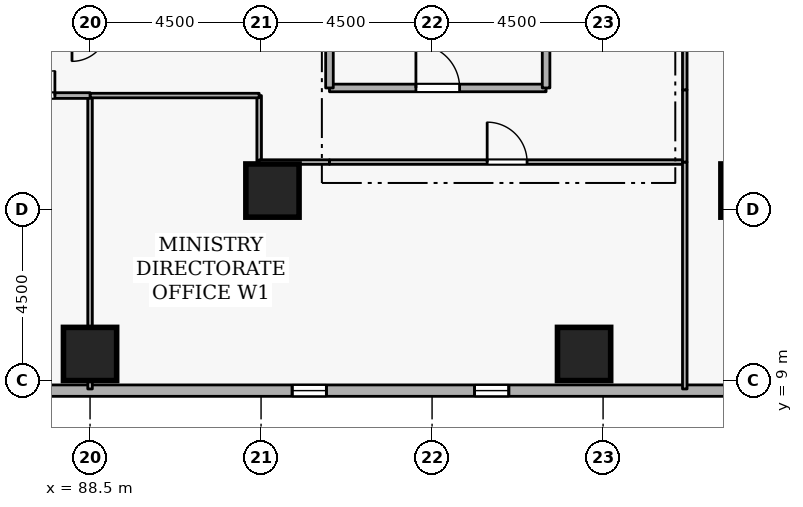
"""IFC4 building model, lengths in metres.
Left out: names, types, materials, properties, quantities, classifications, styles, units other than length and angle.
Written with IfcOpenShell. Run it as: python <this file> out.ifc"""

import sys

from ifc_helpers import new_model, si_unit, direction, frame, frame_2d, origin, origin_2d, place, context, subcontext, project, spatial, rectangle, extrude, element, fill, save


model = new_model("IFC4")
c1 = context("Model", 3, precision=1e-05, world=origin(), true_north=direction((0.0, 1.0)))
c2 = subcontext(c1, "Body", "Model", "MODEL_VIEW")
j1 = project(units=[si_unit("LENGTHUNIT", "METRE"), si_unit("PLANEANGLEUNIT", "RADIAN")], contexts=[c1])
p1 = place(None, origin())
s1 = spatial("IfcSite", under=j1, at=p1, CompositionType="ELEMENT")
p2 = place(p1, origin())
s2 = spatial("IfcBuilding", under=s1, at=p2, CompositionType="ELEMENT")
p3 = place(p2, frame((0.0, 0.0, 64.5)))
s3 = spatial("IfcBuildingStorey", under=s2, at=p3, CompositionType="ELEMENT", Elevation=64.5)
for number, where, z_axis, x_axis in (
    (1, (105.8, 14.0, 0.0), (0.0, 0.0, 1.0), (1.0, 0.0, 0.0)),
    (2, (101.5, 9.7, 0.0), (0.0, 0.0, 1.0), (1.0, 0.0, 0.0)),
    (3, (88.5, 9.7, 0.0), (0.0, 0.0, 1.0), (1.0, 0.0, 0.0)),
    (4, (93.3, 14.0, 0.0), (0.0, 0.0, 1.0), (1.0, 0.0, 0.0)),
):
    element("IfcColumn", number, at=place(p3, frame(where, z_axis=z_axis, x_axis=x_axis)), inside=s3, PredefinedType="COLUMN", context=c2, shape_type="SweptSolid", body=[
        extrude(rectangle(XDim=1.4, YDim=1.4, at=origin_2d()), origin(), (0.0, 0.0, 1.0), 3.6),
    ])
p4 = place(p3, frame((72.819, 8.735, 0.0), z_axis=(0.0, 0.0, 1.0), x_axis=(0.999999999457, 3.2959355e-05, 0.0)))
e5 = element("IfcWall", 5, at=p4, inside=s3, PredefinedType="STANDARD", context=c2, shape_type="SweptSolid", body=[
    extrude(rectangle(XDim=37.037, YDim=0.3, at=frame_2d((18.518, 0.0))), origin(), (0.0, 0.0, 1.0), 2.7),
])
p5 = place(p4, frame((6.6, 0.0, 0.72)))
e6 = element("IfcOpeningElement", 6, at=p5, cuts=e5, PredefinedType="OPENING", context=c2, shape_type="SweptSolid", body=[
    extrude(rectangle(XDim=0.9, YDim=1.75, at=frame_2d((0.45, 0.875))), frame((0.0, 0.16, 0.0), z_axis=(0.0, -1.0, 0.0), x_axis=(1.0, 0.0, 0.0)), (0.0, 0.0, 1.0), 0.32),
])
p6 = place(p4, frame((11.4, 0.0, 0.72)))
e7 = element("IfcOpeningElement", 7, at=p6, cuts=e5, PredefinedType="OPENING", context=c2, shape_type="SweptSolid", body=[
    extrude(rectangle(XDim=0.9, YDim=1.75, at=frame_2d((0.45, 0.875))), frame((0.0, 0.16, 0.0), z_axis=(0.0, -1.0, 0.0), x_axis=(1.0, 0.0, 0.0)), (0.0, 0.0, 1.0), 0.32),
])
p7 = place(p4, frame((21.0, 0.0, 0.72)))
e8 = element("IfcOpeningElement", 8, at=p7, cuts=e5, PredefinedType="OPENING", context=c2, shape_type="SweptSolid", body=[
    extrude(rectangle(XDim=0.9, YDim=1.75, at=frame_2d((0.45, 0.875))), frame((0.0, 0.16, 0.0), z_axis=(0.0, -1.0, 0.0), x_axis=(1.0, 0.0, 0.0)), (0.0, 0.0, 1.0), 0.32),
])
p8 = place(p4, frame((25.8, 0.0, 0.72)))
e9 = element("IfcOpeningElement", 9, at=p8, cuts=e5, PredefinedType="OPENING", context=c2, shape_type="SweptSolid", body=[
    extrude(rectangle(XDim=0.9, YDim=1.75, at=frame_2d((0.45, 0.875))), frame((0.0, 0.16, 0.0), z_axis=(0.0, -1.0, 0.0), x_axis=(1.0, 0.0, 0.0)), (0.0, 0.0, 1.0), 0.32),
])
p9 = place(p3, frame((94.8, 16.7, 0.0), z_axis=(0.0, 0.0, 1.0), x_axis=(1.0, 0.0, 0.0)))
e10 = element("IfcWall", 10, at=p9, inside=s3, PredefinedType="STANDARD", context=c2, shape_type="SweptSolid", body=[
    extrude(rectangle(XDim=5.7, YDim=0.2, at=frame_2d((2.85, 0.0))), origin(), (0.0, 0.0, 1.0), 3.34),
])
p10 = place(p9, frame((2.275, 0.0, 0.0)))
e11 = element("IfcOpeningElement", 11, at=p10, cuts=e10, PredefinedType="OPENING", context=c2, shape_type="SweptSolid", body=[
    extrude(rectangle(XDim=1.15, YDim=2.1, at=frame_2d((0.575, 1.05))), frame((0.0, 0.11, 0.0), z_axis=(0.0, -1.0, 0.0), x_axis=(1.0, 0.0, 0.0)), (0.0, 0.0, 1.0), 0.22),
])
for number, where, z_axis, x_axis in (
    (12, (100.5, 16.7, 0.0), (0.0, 0.0, 1.0), (0.0, 1.0, 0.0)),
    (13, (94.8, 19.2, 0.0), (0.0, 0.0, 1.0), (0.0, -1.0, 0.0)),
):
    element("IfcWall", number, at=place(p3, frame(where, z_axis=z_axis, x_axis=x_axis)), inside=s3, PredefinedType="STANDARD", context=c2, shape_type="SweptSolid", body=[
        extrude(rectangle(XDim=2.5, YDim=0.2, at=frame_2d((1.25, 0.0))), origin(), (0.0, 0.0, 1.0), 3.34),
    ])
p11 = place(p3, frame((92.95, 16.5, 0.0), z_axis=(0.0, 0.0, 1.0), x_axis=(0.0, -1.0, 0.0)))
e14 = element("IfcWall", 14, at=p11, inside=s3, PredefinedType="PARTITIONING", context=c2, shape_type="SweptSolid", body=[
    extrude(rectangle(XDim=1.75, YDim=0.12, at=frame_2d((0.875, 0.0))), origin(), (0.0, 0.0, 1.0), 3.34),
])
p12 = place(p3, frame((92.95, 14.75, 0.0), z_axis=(0.0, 0.0, 1.0), x_axis=(1.0, 0.0, 0.0)))
e15 = element("IfcWall", 15, at=p12, inside=s3, PredefinedType="PARTITIONING", context=c2, shape_type="SweptSolid", body=[
    extrude(rectangle(XDim=1.85, YDim=0.12, at=frame_2d((0.925, 0.0))), origin(), (0.0, 0.0, 1.0), 3.34),
])
p13 = place(p3, frame((94.8, 14.75, 0.0), z_axis=(0.0, 0.0, 1.0), x_axis=(1.0, 0.0, 0.0)))
e16 = element("IfcWall", 16, at=p13, inside=s3, PredefinedType="PARTITIONING", context=c2, shape_type="SweptSolid", body=[
    extrude(rectangle(XDim=9.35, YDim=0.12, at=frame_2d((4.675, 0.0))), origin(), (0.0, 0.0, 1.0), 3.34),
])
p14 = place(p13, frame((4.15, 0.0, 0.0)))
e17 = element("IfcOpeningElement", 17, at=p14, cuts=e16, PredefinedType="OPENING", context=c2, shape_type="SweptSolid", body=[
    extrude(rectangle(XDim=1.05, YDim=2.1, at=frame_2d((0.525, 1.05))), frame((0.0, 0.07, 0.0), z_axis=(0.0, -1.0, 0.0), x_axis=(1.0, 0.0, 0.0)), (0.0, 0.0, 1.0), 0.14),
])
p15 = place(p3, frame((104.15, 14.75, 0.0), z_axis=(0.0, 0.0, 1.0), x_axis=(0.0, -1.0, 0.0)))
e18 = element("IfcWall", 18, at=p15, inside=s3, PredefinedType="PARTITIONING", context=c2, shape_type="SweptSolid", body=[
    extrude(rectangle(XDim=5.97, YDim=0.12, at=frame_2d((2.985, 0.0))), origin(), (0.0, 0.0, 1.0), 3.34),
])
p16 = place(p3, frame((88.5, 8.78, 0.0), z_axis=(0.0, 0.0, 1.0), x_axis=(0.0, 1.0, 0.0)))
e19 = element("IfcWall", 19, at=p16, inside=s3, PredefinedType="PARTITIONING", context=c2, shape_type="SweptSolid", body=[
    extrude(rectangle(XDim=7.72, YDim=0.12, at=frame_2d((3.86, 0.0))), origin(), (0.0, 0.0, 1.0), 2.878),
])
p17 = place(p3, frame((88.5, 16.5, 0.0), z_axis=(0.0, 0.0, 1.0), x_axis=(1.0, 0.0, 0.0)))
e20 = element("IfcWall", 20, at=p17, inside=s3, PredefinedType="PARTITIONING", context=c2, shape_type="SweptSolid", body=[
    extrude(rectangle(XDim=4.45, YDim=0.12, at=frame_2d((2.225, 0.0))), origin(), (0.0, 0.0, 1.0), 3.34),
])
p18 = place(p3, frame((85.35, 16.5, 0.0), z_axis=(0.0, 0.0, 1.0), x_axis=(1.0, 0.0, 0.0)))
e21 = element("IfcWall", 21, at=p18, inside=s3, PredefinedType="PARTITIONING", context=c2, shape_type="SweptSolid", body=[
    extrude(rectangle(XDim=3.15, YDim=0.15, at=frame_2d((1.575, 0.0))), origin(), (0.0, 0.0, 1.0), 3.34),
])
p19 = place(p18, frame((0.925, 0.0, 0.0)))
e22 = element("IfcOpeningElement", 22, at=p19, cuts=e21, PredefinedType="OPENING", context=c2, shape_type="SweptSolid", body=[
    extrude(rectangle(XDim=1.3, YDim=2.12, at=frame_2d((0.65, 1.06))), frame((0.0, 0.085, 0.0), z_axis=(0.0, -1.0, 0.0), x_axis=(1.0, 0.0, 0.0)), (0.0, 0.0, 1.0), 0.17),
])
p20 = place(p3, frame((104.15, 14.75, 0.0), z_axis=(0.0, 0.0, 1.0), x_axis=(0.0, 1.0, 0.0)))
e23 = element("IfcWall", 23, at=p20, inside=s3, PredefinedType="PARTITIONING", context=c2, shape_type="SweptSolid", body=[
    extrude(rectangle(XDim=1.9, YDim=0.12, at=frame_2d((0.95, 0.0))), origin(), (0.0, 0.0, 1.0), 3.34),
])
p21 = place(p3, frame((104.15, 16.65, 0.0), z_axis=(0.0, 0.0, 1.0), x_axis=(0.0, 1.0, 0.0)))
e24 = element("IfcWall", 24, at=p21, inside=s3, PredefinedType="PARTITIONING", context=c2, shape_type="SweptSolid", body=[
    extrude(rectangle(XDim=4.85, YDim=0.12, at=frame_2d((2.425, 0.0))), origin(), (0.0, 0.0, 1.0), 3.34),
])
p22 = place(p21, frame((1.9, 0.0, 0.0)))
e25 = element("IfcOpeningElement", 25, at=p22, cuts=e24, PredefinedType="OPENING", context=c2, shape_type="SweptSolid", body=[
    extrude(rectangle(XDim=1.05, YDim=2.1, at=frame_2d((0.525, 1.05))), frame((0.0, 0.07, 0.0), z_axis=(0.0, -1.0, 0.0), x_axis=(1.0, 0.0, 0.0)), (0.0, 0.0, 1.0), 0.14),
])
p23 = place(p7, origin())
e26 = element("IfcWindow", 26, at=p23, inside=s3, PartitioningType="SINGLE_PANEL", PredefinedType="WINDOW", context=c2, shape_type="SweptSolid", body=[
    extrude(rectangle(XDim=0.9, YDim=1.75, at=frame_2d((0.45, 0.875))), frame((0.0, 0.03, 0.0), z_axis=(0.0, -1.0, 0.0), x_axis=(1.0, 0.0, 0.0)), (0.0, 0.0, 1.0), 0.06),
])
fill(e8, e26)
p24 = place(p8, origin())
e27 = element("IfcWindow", 27, at=p24, inside=s3, PartitioningType="SINGLE_PANEL", PredefinedType="WINDOW", context=c2, shape_type="SweptSolid", body=[
    extrude(rectangle(XDim=0.9, YDim=1.75, at=frame_2d((0.45, 0.875))), frame((0.0, 0.03, 0.0), z_axis=(0.0, -1.0, 0.0), x_axis=(1.0, 0.0, 0.0)), (0.0, 0.0, 1.0), 0.06),
])
fill(e9, e27)
p25 = place(p10, origin())
e28 = element("IfcDoor", 28, at=p25, inside=s3, OperationType="SINGLE_SWING_LEFT", PredefinedType="DOOR", context=c2, shape_type="SweptSolid", body=[
    extrude(rectangle(XDim=1.15, YDim=2.1, at=frame_2d((0.575, 1.05))), frame((0.0, 0.025, 0.0), z_axis=(0.0, -1.0, 0.0), x_axis=(1.0, 0.0, 0.0)), (0.0, 0.0, 1.0), 0.05),
])
fill(e11, e28)
p26 = place(p14, origin())
e29 = element("IfcDoor", 29, at=p26, inside=s3, OperationType="SINGLE_SWING_LEFT", PredefinedType="DOOR", context=c2, shape_type="SweptSolid", body=[
    extrude(rectangle(XDim=1.05, YDim=2.1, at=frame_2d((0.525, 1.05))), frame((0.0, 0.025, 0.0), z_axis=(0.0, -1.0, 0.0), x_axis=(1.0, 0.0, 0.0)), (0.0, 0.0, 1.0), 0.05),
])
fill(e17, e29)
p27 = place(p19, origin())
e30 = element("IfcDoor", 30, at=p27, inside=s3, OperationType="DOUBLE_DOOR_SINGLE_SWING", PredefinedType="DOOR", context=c2, shape_type="SweptSolid", body=[
    extrude(rectangle(XDim=1.3, YDim=2.12, at=frame_2d((0.65, 1.06))), frame((0.0, 0.025, 0.0), z_axis=(0.0, -1.0, 0.0), x_axis=(1.0, 0.0, 0.0)), (0.0, 0.0, 1.0), 0.05),
])
fill(e22, e30)
save(model, sys.argv[1])
